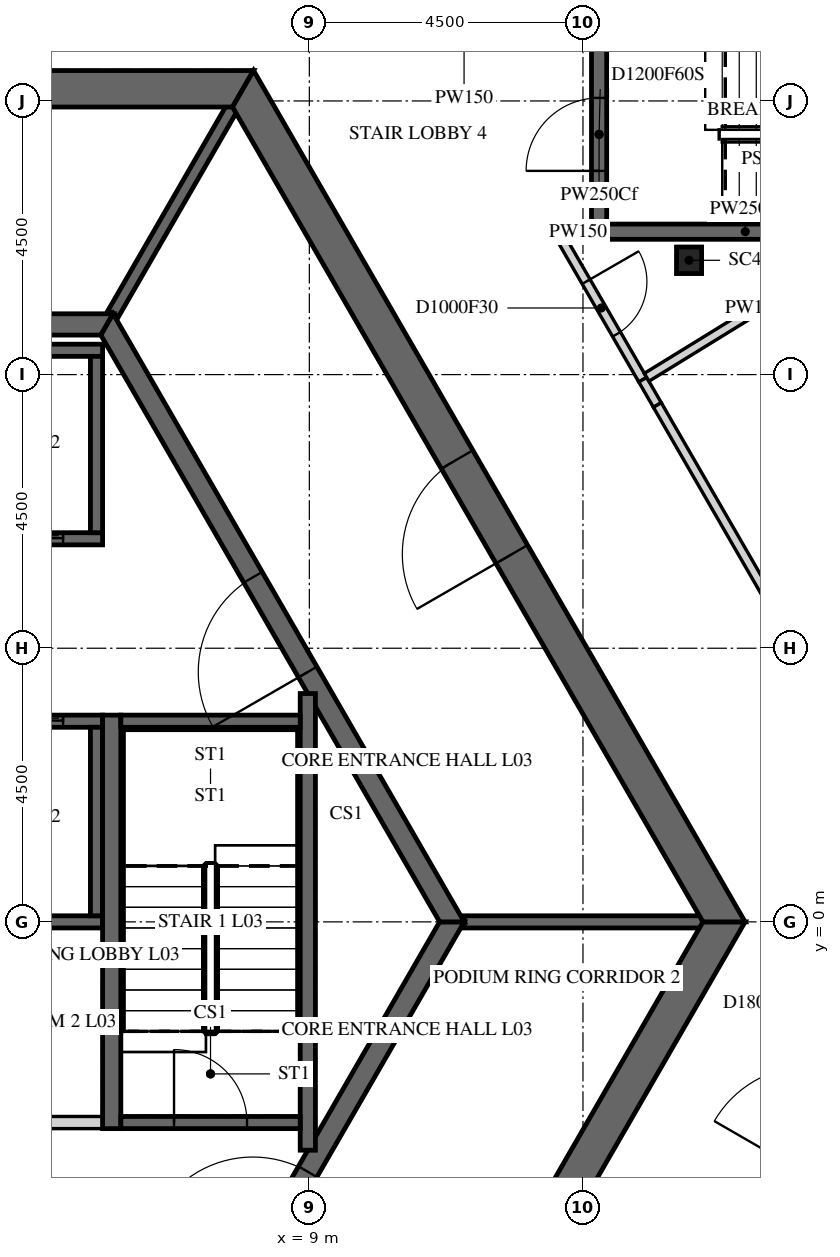
"""IFC4 building model, lengths in metres.
Left out: names, types, materials, properties, quantities, classifications, styles, units other than length and angle.
Written with IfcOpenShell. Run it as: python <this file> out.ifc"""

import sys

from ifc_helpers import new_model, si_unit, direction, frame, frame_2d, origin, origin_2d, place, context, subcontext, project, spatial, polyline, rectangle, i_section, outline, extrude, element, fill, save


model = new_model("IFC4")
c1 = context("Model", 3, precision=1e-05, world=origin(), true_north=direction((0.0, 1.0)))
c2 = subcontext(c1, "Body", "Model", "MODEL_VIEW")
j1 = project(units=[si_unit("LENGTHUNIT", "METRE"), si_unit("PLANEANGLEUNIT", "RADIAN")], contexts=[c1])
p1 = place(None, origin())
s1 = spatial("IfcSite", under=j1, at=p1, CompositionType="ELEMENT")
p2 = place(p1, origin())
s2 = spatial("IfcBuilding", under=s1, at=p2, CompositionType="ELEMENT")
p3 = place(p2, frame((0.0, 0.0, 20.5)))
s3 = spatial("IfcBuildingStorey", under=s2, at=p3, CompositionType="ELEMENT", Elevation=20.5)
p4 = place(p3, frame((15.245, 10.88, -0.25), z_axis=(0.0, 0.0, 1.0), x_axis=(1.0, 0.0, 0.0)))
e1 = element("IfcColumn", 1, at=p4, inside=s3, PredefinedType="COLUMN", context=c2, shape_type="SweptSolid", body=[
    extrude(i_section(OverallWidth=0.412, OverallDepth=0.437, WebThickness=0.036, FlangeThickness=0.058, FilletRadius=0.015, at=origin_2d()), origin(), (0.0, 0.0, 1.0), 5.5),
])
p5 = place(p3, frame((7.91, -13.7, -0.25), z_axis=(0.0, 0.0, 1.0), x_axis=(0.499999880136, 0.866025472988, 0.0)))
e2 = element("IfcWall", 2, at=p5, inside=s3, PredefinedType="SHEAR", context=c2, shape_type="SweptSolid", body=[
    extrude(outline(polyline([(-0.173, -0.3), (15.993, -0.3), (15.646, 0.3), (0.173, 0.3), (-0.173, -0.3)])), origin(), (0.0, 0.0, 1.0), 5.5),
])
p6 = place(p5, frame((7.039, 0.0, 0.25)))
e3 = element("IfcOpeningElement", 3, at=p6, cuts=e2, PredefinedType="OPENING", context=c2, shape_type="SweptSolid", body=[
    extrude(rectangle(XDim=1.8, YDim=2.4, at=frame_2d((0.9, 1.2))), frame((0.0, 0.31, 0.0), z_axis=(0.0, -1.0, 0.0), x_axis=(1.0, 0.0, 0.0)), (0.0, 0.0, 1.0), 0.62),
])
p7 = place(p3, frame((15.819, 0.0, -0.25), z_axis=(0.0, 0.0, 1.0), x_axis=(-0.499999880136, 0.866025472988, 0.0)))
e4 = element("IfcWall", 4, at=p7, inside=s3, PredefinedType="SHEAR", context=c2, shape_type="SweptSolid", body=[
    extrude(outline(polyline([(-0.173, -0.3), (15.993, -0.3), (15.646, 0.3), (0.173, 0.3), (-0.173, -0.3)])), origin(), (0.0, 0.0, 1.0), 5.5),
])
p8 = place(p7, frame((6.981, 0.0, 0.25)))
e5 = element("IfcOpeningElement", 5, at=p8, cuts=e4, PredefinedType="OPENING", context=c2, shape_type="SweptSolid", body=[
    extrude(rectangle(XDim=1.8, YDim=2.4, at=frame_2d((0.9, 1.2))), frame((0.0, 0.31, 0.0), z_axis=(0.0, -1.0, 0.0), x_axis=(1.0, 0.0, 0.0)), (0.0, 0.0, 1.0), 0.62),
])
p9 = place(p3, frame((7.91, 13.7, -0.25), z_axis=(0.0, 0.0, 1.0), x_axis=(-1.0, 0.0, 0.0)))
e6 = element("IfcWall", 6, at=p9, inside=s3, PredefinedType="SHEAR", context=c2, shape_type="SweptSolid", body=[
    extrude(outline(polyline([(-0.173, -0.3), (15.993, -0.3), (15.646, 0.3), (0.173, 0.3), (-0.173, -0.3)])), origin(), (0.0, 0.0, 1.0), 5.5),
])
p10 = place(p9, frame((7.31, 0.0, 0.25)))
e7 = element("IfcOpeningElement", 7, at=p10, cuts=e6, PredefinedType="OPENING", context=c2, shape_type="SweptSolid", body=[
    extrude(rectangle(XDim=1.2, YDim=2.4, at=frame_2d((0.6, 1.2))), frame((0.0, 0.31, 0.0), z_axis=(0.0, -1.0, 0.0), x_axis=(1.0, 0.0, 0.0)), (0.0, 0.0, 1.0), 0.62),
])
p11 = place(p3, frame((5.673, -9.825, -0.25), z_axis=(0.0, 0.0, 1.0), x_axis=(0.499995046907, 0.866028263435, 0.0)))
e8 = element("IfcWall", 8, at=p11, inside=s3, PredefinedType="SHEAR", context=c2, shape_type="SweptSolid", body=[
    extrude(outline(polyline([(-0.101, -0.175), (11.446, -0.175), (11.244, 0.175), (0.101, 0.175), (-0.101, -0.175)])), origin(), (0.0, 0.0, 1.0), 5.5),
])
p12 = place(p11, frame((4.801, 0.0, 0.25)))
e9 = element("IfcOpeningElement", 9, at=p12, cuts=e8, PredefinedType="OPENING", context=c2, shape_type="SweptSolid", body=[
    extrude(rectangle(XDim=1.8, YDim=2.4, at=frame_2d((0.9, 1.2))), frame((0.0, 0.185, 0.0), z_axis=(0.0, -1.0, 0.0), x_axis=(1.0, 0.0, 0.0)), (0.0, 0.0, 1.0), 0.37),
])
p13 = place(p3, frame((11.345, 0.0, -0.25), z_axis=(0.0, 0.0, 1.0), x_axis=(-0.499995046907, 0.866028263435, 0.0)))
e10 = element("IfcWall", 10, at=p13, inside=s3, PredefinedType="SHEAR", context=c2, shape_type="SweptSolid", body=[
    extrude(outline(polyline([(-0.101, -0.175), (11.446, -0.175), (11.244, 0.175), (0.101, 0.175), (-0.101, -0.175)])), origin(), (0.0, 0.0, 1.0), 5.5),
])
p14 = place(p13, frame((4.744, 0.0, 0.25)))
e11 = element("IfcOpeningElement", 11, at=p14, cuts=e10, PredefinedType="OPENING", context=c2, shape_type="SweptSolid", body=[
    extrude(rectangle(XDim=1.8, YDim=2.4, at=frame_2d((0.9, 1.2))), frame((0.0, 0.185, 0.0), z_axis=(0.0, -1.0, 0.0), x_axis=(1.0, 0.0, 0.0)), (0.0, 0.0, 1.0), 0.37),
])
p15 = place(p3, frame((5.673, 9.825, -0.25), z_axis=(0.0, 0.0, 1.0), x_axis=(-1.0, 0.0, 0.0)))
e12 = element("IfcWall", 12, at=p15, inside=s3, PredefinedType="SHEAR", context=c2, shape_type="SweptSolid", body=[
    extrude(outline(polyline([(-0.101, -0.175), (11.446, -0.175), (11.244, 0.175), (0.101, 0.175), (-0.101, -0.175)])), origin(), (0.0, 0.0, 1.0), 5.5),
])
p16 = place(p3, frame((-5.6, 6.3, -0.25), z_axis=(0.0, 0.0, 1.0), x_axis=(1.0, 0.0, 0.0)))
e13 = element("IfcWall", 13, at=p16, inside=s3, PredefinedType="SHEAR", context=c2, shape_type="SweptSolid", body=[
    extrude(rectangle(XDim=11.2, YDim=0.2, at=frame_2d((5.6, 0.0))), origin(), (0.0, 0.0, 1.0), 5.5),
])
p17 = place(p16, frame((0.65, 0.0, 0.25)))
e14 = element("IfcOpeningElement", 14, at=p17, cuts=e13, PredefinedType="OPENING", context=c2, shape_type="SweptSolid", body=[
    extrude(rectangle(XDim=1.1, YDim=2.1, at=frame_2d((0.55, 1.05))), frame((0.0, 0.11, 0.0), z_axis=(0.0, -1.0, 0.0), x_axis=(1.0, 0.0, 0.0)), (0.0, 0.0, 1.0), 0.22),
])
p18 = place(p16, frame((2.85, 0.0, 0.25)))
e15 = element("IfcOpeningElement", 15, at=p18, cuts=e13, PredefinedType="OPENING", context=c2, shape_type="SweptSolid", body=[
    extrude(rectangle(XDim=1.1, YDim=2.1, at=frame_2d((0.55, 1.05))), frame((0.0, 0.11, 0.0), z_axis=(0.0, -1.0, 0.0), x_axis=(1.0, 0.0, 0.0)), (0.0, 0.0, 1.0), 0.22),
])
p19 = place(p16, frame((5.05, 0.0, 0.25)))
e16 = element("IfcOpeningElement", 16, at=p19, cuts=e13, PredefinedType="OPENING", context=c2, shape_type="SweptSolid", body=[
    extrude(rectangle(XDim=1.1, YDim=2.1, at=frame_2d((0.55, 1.05))), frame((0.0, 0.11, 0.0), z_axis=(0.0, -1.0, 0.0), x_axis=(1.0, 0.0, 0.0)), (0.0, 0.0, 1.0), 0.22),
])
p20 = place(p16, frame((7.25, 0.0, 0.25)))
e17 = element("IfcOpeningElement", 17, at=p20, cuts=e13, PredefinedType="OPENING", context=c2, shape_type="SweptSolid", body=[
    extrude(rectangle(XDim=1.1, YDim=2.1, at=frame_2d((0.55, 1.05))), frame((0.0, 0.11, 0.0), z_axis=(0.0, -1.0, 0.0), x_axis=(1.0, 0.0, 0.0)), (0.0, 0.0, 1.0), 0.22),
])
p21 = place(p16, frame((9.45, 0.0, 0.25)))
e18 = element("IfcOpeningElement", 18, at=p21, cuts=e13, PredefinedType="OPENING", context=c2, shape_type="SweptSolid", body=[
    extrude(rectangle(XDim=1.1, YDim=2.1, at=frame_2d((0.55, 1.05))), frame((0.0, 0.11, 0.0), z_axis=(0.0, -1.0, 0.0), x_axis=(1.0, 0.0, 0.0)), (0.0, 0.0, 1.0), 0.22),
])
p22 = place(p3, frame((-5.6, 9.4, -0.25), z_axis=(0.0, 0.0, 1.0), x_axis=(1.0, 0.0, 0.0)))
e19 = element("IfcWall", 19, at=p22, inside=s3, PredefinedType="SHEAR", context=c2, shape_type="SweptSolid", body=[
    extrude(rectangle(XDim=11.2, YDim=0.2, at=frame_2d((5.6, 0.0))), origin(), (0.0, 0.0, 1.0), 5.5),
])
p23 = place(p3, frame((5.5, 6.4, -0.25), z_axis=(0.0, 0.0, 1.0), x_axis=(0.0, 1.0, 0.0)))
e20 = element("IfcWall", 20, at=p23, inside=s3, PredefinedType="SHEAR", context=c2, shape_type="SweptSolid", body=[
    extrude(rectangle(XDim=2.9, YDim=0.2, at=frame_2d((1.45, 0.0))), origin(), (0.0, 0.0, 1.0), 5.5),
])
p24 = place(p3, frame((-5.6, 3.3, -0.25), z_axis=(0.0, 0.0, 1.0), x_axis=(1.0, 0.0, 0.0)))
e21 = element("IfcWall", 21, at=p24, inside=s3, PredefinedType="SHEAR", context=c2, shape_type="SweptSolid", body=[
    extrude(rectangle(XDim=11.2, YDim=0.2, at=frame_2d((5.6, 0.0))), origin(), (0.0, 0.0, 1.0), 5.5),
])
p25 = place(p24, frame((0.65, 0.0, 0.25)))
e22 = element("IfcOpeningElement", 22, at=p25, cuts=e21, PredefinedType="OPENING", context=c2, shape_type="SweptSolid", body=[
    extrude(rectangle(XDim=1.1, YDim=2.1, at=frame_2d((0.55, 1.05))), frame((0.0, 0.11, 0.0), z_axis=(0.0, -1.0, 0.0), x_axis=(1.0, 0.0, 0.0)), (0.0, 0.0, 1.0), 0.22),
])
p26 = place(p24, frame((2.85, 0.0, 0.25)))
e23 = element("IfcOpeningElement", 23, at=p26, cuts=e21, PredefinedType="OPENING", context=c2, shape_type="SweptSolid", body=[
    extrude(rectangle(XDim=1.1, YDim=2.1, at=frame_2d((0.55, 1.05))), frame((0.0, 0.11, 0.0), z_axis=(0.0, -1.0, 0.0), x_axis=(1.0, 0.0, 0.0)), (0.0, 0.0, 1.0), 0.22),
])
p27 = place(p24, frame((5.05, 0.0, 0.25)))
e24 = element("IfcOpeningElement", 24, at=p27, cuts=e21, PredefinedType="OPENING", context=c2, shape_type="SweptSolid", body=[
    extrude(rectangle(XDim=1.1, YDim=2.1, at=frame_2d((0.55, 1.05))), frame((0.0, 0.11, 0.0), z_axis=(0.0, -1.0, 0.0), x_axis=(1.0, 0.0, 0.0)), (0.0, 0.0, 1.0), 0.22),
])
p28 = place(p24, frame((7.25, 0.0, 0.25)))
e25 = element("IfcOpeningElement", 25, at=p28, cuts=e21, PredefinedType="OPENING", context=c2, shape_type="SweptSolid", body=[
    extrude(rectangle(XDim=1.1, YDim=2.1, at=frame_2d((0.55, 1.05))), frame((0.0, 0.11, 0.0), z_axis=(0.0, -1.0, 0.0), x_axis=(1.0, 0.0, 0.0)), (0.0, 0.0, 1.0), 0.22),
])
p29 = place(p24, frame((9.45, 0.0, 0.25)))
e26 = element("IfcOpeningElement", 26, at=p29, cuts=e21, PredefinedType="OPENING", context=c2, shape_type="SweptSolid", body=[
    extrude(rectangle(XDim=1.1, YDim=2.1, at=frame_2d((0.55, 1.05))), frame((0.0, 0.11, 0.0), z_axis=(0.0, -1.0, 0.0), x_axis=(1.0, 0.0, 0.0)), (0.0, 0.0, 1.0), 0.22),
])
p30 = place(p3, frame((-5.6, 0.0, -0.25), z_axis=(0.0, 0.0, 1.0), x_axis=(1.0, 0.0, 0.0)))
e27 = element("IfcWall", 27, at=p30, inside=s3, PredefinedType="SHEAR", context=c2, shape_type="SweptSolid", body=[
    extrude(rectangle(XDim=11.2, YDim=0.2, at=frame_2d((5.6, 0.0))), origin(), (0.0, 0.0, 1.0), 5.5),
])
p31 = place(p3, frame((5.5, 0.1, -0.25), z_axis=(0.0, 0.0, 1.0), x_axis=(0.0, 1.0, 0.0)))
e28 = element("IfcWall", 28, at=p31, inside=s3, PredefinedType="SHEAR", context=c2, shape_type="SweptSolid", body=[
    extrude(rectangle(XDim=3.1, YDim=0.2, at=frame_2d((1.55, 0.0))), origin(), (0.0, 0.0, 1.0), 5.5),
])
p32 = place(p3, frame((0.1, -3.3, 0.0), z_axis=(0.0, 0.0, 1.0), x_axis=(1.0, 0.0, 0.0)))
e29 = element("IfcWall", 29, at=p32, inside=s3, PredefinedType="PARTITIONING", context=c2, shape_type="SweptSolid", body=[
    extrude(rectangle(XDim=5.5, YDim=0.2, at=frame_2d((2.75, 0.0))), origin(), (0.0, 0.0, 1.0), 5.25),
])
p33 = place(p32, frame((2.3, 0.0, 0.0)))
e30 = element("IfcOpeningElement", 30, at=p33, cuts=e29, PredefinedType="OPENING", context=c2, shape_type="SweptSolid", body=[
    extrude(rectangle(XDim=0.9, YDim=2.1, at=frame_2d((0.45, 1.05))), frame((0.0, 0.11, 0.0), z_axis=(0.0, -1.0, 0.0), x_axis=(1.0, 0.0, 0.0)), (0.0, 0.0, 1.0), 0.22),
])
p34 = place(p3, frame((11.547, 0.0, -0.25), z_axis=(0.0, 0.0, 1.0), x_axis=(1.0, 0.0, 0.0)))
e31 = element("IfcWall", 31, at=p34, inside=s3, PredefinedType="SHEAR", context=c2, shape_type="SweptSolid", body=[
    extrude(rectangle(XDim=3.926, YDim=0.2, at=frame_2d((1.963, 0.0))), origin(), (0.0, 0.0, 1.0), 5.5),
])
p35 = place(p3, frame((5.773, 10.0, -0.25), z_axis=(0.0, 0.0, 1.0), x_axis=(0.500038251005, 0.86600331843, 0.0)))
e32 = element("IfcWall", 32, at=p35, inside=s3, PredefinedType="SHEAR", context=c2, shape_type="SweptSolid", body=[
    extrude(rectangle(XDim=3.926, YDim=0.2, at=frame_2d((1.963, 0.0))), origin(), (0.0, 0.0, 1.0), 5.5),
])
p36 = place(p3, frame((5.75, -3.4, -0.25), z_axis=(0.0, 0.0, 1.0), x_axis=(0.0, 1.0, 0.0)))
e33 = element("IfcWall", 33, at=p36, inside=s3, PredefinedType="SHEAR", context=c2, shape_type="SweptSolid", body=[
    extrude(rectangle(XDim=6.8, YDim=0.3, at=frame_2d((3.4, 0.0))), origin(), (0.0, 0.0, 1.0), 5.5),
])
p37 = place(p3, frame((8.975, -3.755, -0.25), z_axis=(0.0, 0.0, 1.0), x_axis=(0.0, 1.0, 0.0)))
e34 = element("IfcWall", 34, at=p37, inside=s3, PredefinedType="SHEAR", context=c2, shape_type="SweptSolid", body=[
    extrude(rectangle(XDim=7.51, YDim=0.25, at=frame_2d((3.755, 0.0))), origin(), (0.0, 0.0, 1.0), 5.5),
])
p38 = place(p3, frame((5.9, 3.3, -0.25), z_axis=(0.0, 0.0, 1.0), x_axis=(1.0, 0.0, 0.0)))
e35 = element("IfcWall", 35, at=p38, inside=s3, PredefinedType="SHEAR", context=c2, shape_type="SweptSolid", body=[
    extrude(rectangle(XDim=2.95, YDim=0.2, at=frame_2d((1.475, 0.0))), origin(), (0.0, 0.0, 1.0), 5.5),
])
p39 = place(p3, frame((5.9, -3.3, -0.25), z_axis=(0.0, 0.0, 1.0), x_axis=(1.0, 0.0, 0.0)))
e36 = element("IfcWall", 36, at=p39, inside=s3, PredefinedType="SHEAR", context=c2, shape_type="SweptSolid", body=[
    extrude(rectangle(XDim=2.95, YDim=0.2, at=frame_2d((1.475, 0.0))), origin(), (0.0, 0.0, 1.0), 5.5),
])
p40 = place(p39, frame((0.875, 0.0, 0.25)))
e37 = element("IfcOpeningElement", 37, at=p40, cuts=e36, PredefinedType="OPENING", context=c2, shape_type="SweptSolid", body=[
    extrude(rectangle(XDim=1.2, YDim=2.4, at=frame_2d((0.6, 1.2))), frame((0.0, 0.11, 0.0), z_axis=(0.0, -1.0, 0.0), x_axis=(1.0, 0.0, 0.0)), (0.0, 0.0, 1.0), 0.22),
])
p41 = place(p3, frame((13.765, 11.35, 0.0), z_axis=(0.0, 0.0, 1.0), x_axis=(-1.0, 0.0, 0.0)))
e38 = element("IfcWall", 38, at=p41, inside=s3, PredefinedType="PARTITIONING", context=c2, shape_type="SweptSolid", body=[
    extrude(rectangle(XDim=0.688, YDim=0.15, at=frame_2d((0.344, 0.0))), origin(), (0.0, 0.0, 1.0), 5.25),
])
p42 = place(p3, frame((13.765, 11.425, 0.0), z_axis=(0.0, 0.0, 1.0), x_axis=(0.0, 1.0, 0.0)))
e39 = element("IfcWall", 39, at=p42, inside=s3, PredefinedType="PARTITIONING", context=c2, shape_type="SweptSolid", body=[
    extrude(rectangle(XDim=3.05, YDim=0.25, at=frame_2d((1.525, 0.0))), origin(), (0.0, 0.0, 1.0), 4.496),
])
p43 = place(p42, frame((0.925, 0.0, 0.0)))
e40 = element("IfcOpeningElement", 40, at=p43, cuts=e39, PredefinedType="OPENING", context=c2, shape_type="SweptSolid", body=[
    extrude(rectangle(XDim=1.2, YDim=2.1, at=frame_2d((0.6, 1.05))), frame((0.0, 0.135, 0.0), z_axis=(0.0, -1.0, 0.0), x_axis=(1.0, 0.0, 0.0)), (0.0, 0.0, 1.0), 0.27),
])
p44 = place(p3, frame((13.12, 11.275, 0.0), z_axis=(0.0, 0.0, 1.0), x_axis=(0.500177554253, -0.865922868517, 0.0)))
e41 = element("IfcWall", 41, at=p44, inside=s3, PredefinedType="PARTITIONING", context=c2, shape_type="SweptSolid", body=[
    extrude(rectangle(XDim=2.724, YDim=0.15, at=frame_2d((1.362, 0.0))), origin(), (0.0, 0.0, 1.0), 5.25),
])
p45 = place(p44, frame((0.862, 0.0, 0.0)))
e42 = element("IfcOpeningElement", 42, at=p45, cuts=e41, PredefinedType="OPENING", context=c2, shape_type="SweptSolid", body=[
    extrude(rectangle(XDim=1.0, YDim=2.1, at=frame_2d((0.5, 1.05))), frame((0.0, 0.085, 0.0), z_axis=(0.0, -1.0, 0.0), x_axis=(1.0, 0.0, 0.0)), (0.0, 0.0, 1.0), 0.17),
])
p46 = place(p3, frame((14.723, 8.5, 0.0), z_axis=(0.0, 0.0, 1.0), x_axis=(-0.499693115345, 0.866202511239, 0.0)))
e43 = element("IfcWall", 43, at=p46, inside=s3, PredefinedType="PARTITIONING", context=c2, shape_type="SweptSolid", body=[
    extrude(rectangle(XDim=0.48, YDim=0.15, at=frame_2d((0.24, 0.0))), origin(), (0.0, 0.0, 1.0), 5.25),
])
p47 = place(p3, frame((15.227, -7.625, 0.0), z_axis=(0.0, 0.0, 1.0), x_axis=(0.500053906551, 0.865994278585, 0.0)))
e44 = element("IfcWall", 44, at=p47, inside=s3, PredefinedType="PARTITIONING", context=c2, shape_type="SweptSolid", body=[
    extrude(rectangle(XDim=6.928, YDim=0.15, at=frame_2d((3.464, 0.0))), origin(), (0.0, 0.0, 1.0), 5.25),
])
p48 = place(p47, frame((1.146, 0.0, 0.0)))
e45 = element("IfcOpeningElement", 45, at=p48, cuts=e44, PredefinedType="OPENING", context=c2, shape_type="SweptSolid", body=[
    extrude(rectangle(XDim=1.8, YDim=2.1, at=frame_2d((0.9, 1.05))), frame((0.0, 0.085, 0.0), z_axis=(0.0, -1.0, 0.0), x_axis=(1.0, 0.0, 0.0)), (0.0, 0.0, 1.0), 0.17),
])
p49 = place(p47, frame((3.983, 0.0, 0.0)))
e46 = element("IfcOpeningElement", 46, at=p49, cuts=e44, PredefinedType="OPENING", context=c2, shape_type="SweptSolid", body=[
    extrude(rectangle(XDim=1.8, YDim=2.1, at=frame_2d((0.9, 1.05))), frame((0.0, 0.085, 0.0), z_axis=(0.0, -1.0, 0.0), x_axis=(1.0, 0.0, 0.0)), (0.0, 0.0, 1.0), 0.17),
])
p50 = place(p3, frame((17.339, 3.968, 0.0), z_axis=(0.0, 0.0, 1.0), x_axis=(-0.499952654668, 0.866052736899, 0.0)))
e47 = element("IfcWall", 47, at=p50, inside=s3, PredefinedType="PARTITIONING", context=c2, shape_type="SweptSolid", body=[
    extrude(rectangle(XDim=5.233, YDim=0.15, at=frame_2d((2.616, 0.0))), origin(), (0.0, 0.0, 1.0), 5.25),
])
p51 = place(p3, frame((18.234, 11.225, 0.0), z_axis=(0.0, 0.0, 1.0), x_axis=(-0.851571181887, -0.524238993379, 0.0)))
e48 = element("IfcWall", 48, at=p51, inside=s3, PredefinedType="PARTITIONING", context=c2, shape_type="SweptSolid", body=[
    extrude(rectangle(XDim=4.33, YDim=0.15, at=frame_2d((2.165, 0.0))), origin(), (0.0, 0.0, 1.0), 4.323),
])
p52 = place(p3, frame((18.447, 11.35, 0.0), z_axis=(0.0, 0.0, 1.0), x_axis=(-1.0, 0.0, 0.0)))
e49 = element("IfcWall", 49, at=p52, inside=s3, PredefinedType="PARTITIONING", context=c2, shape_type="SweptSolid", body=[
    extrude(rectangle(XDim=4.557, YDim=0.25, at=frame_2d((2.279, 0.0))), origin(), (0.0, 0.0, 1.0), 5.25),
])
p53 = place(p8, origin())
e50 = element("IfcDoor", 50, at=p53, inside=s3, OperationType="DOUBLE_DOOR_SINGLE_SWING", PredefinedType="DOOR", context=c2, shape_type="SweptSolid", body=[
    extrude(rectangle(XDim=1.8, YDim=2.4, at=frame_2d((0.9, 1.2))), frame((0.0, 0.025, 0.0), z_axis=(0.0, -1.0, 0.0), x_axis=(1.0, 0.0, 0.0)), (0.0, 0.0, 1.0), 0.05),
])
fill(e5, e50)
p54 = place(p14, origin())
e51 = element("IfcDoor", 51, at=p54, inside=s3, OperationType="DOUBLE_DOOR_SINGLE_SWING", PredefinedType="DOOR", context=c2, shape_type="SweptSolid", body=[
    extrude(rectangle(XDim=1.8, YDim=2.4, at=frame_2d((0.9, 1.2))), frame((0.0, 0.025, 0.0), z_axis=(0.0, -1.0, 0.0), x_axis=(1.0, 0.0, 0.0)), (0.0, 0.0, 1.0), 0.05),
])
fill(e11, e51)
p55 = place(p12, origin())
e52 = element("IfcDoor", 52, at=p55, inside=s3, OperationType="DOUBLE_DOOR_SINGLE_SWING", PredefinedType="DOOR", context=c2, shape_type="SweptSolid", body=[
    extrude(rectangle(XDim=1.8, YDim=2.4, at=frame_2d((0.9, 1.2))), frame((0.0, 0.025, 0.0), z_axis=(0.0, -1.0, 0.0), x_axis=(1.0, 0.0, 0.0)), (0.0, 0.0, 1.0), 0.05),
])
fill(e9, e52)
p56 = place(p40, origin())
e53 = element("IfcDoor", 53, at=p56, inside=s3, OperationType="SINGLE_SWING_LEFT", PredefinedType="DOOR", context=c2, shape_type="SweptSolid", body=[
    extrude(rectangle(XDim=1.2, YDim=2.4, at=frame_2d((0.6, 1.2))), frame((0.0, 0.025, 0.0), z_axis=(0.0, -1.0, 0.0), x_axis=(1.0, 0.0, 0.0)), (0.0, 0.0, 1.0), 0.05),
])
fill(e37, e53)
p57 = place(p21, origin())
e54 = element("IfcDoor", 54, at=p57, inside=s3, OperationType="SLIDING_TO_LEFT", PredefinedType="DOOR", context=c2, shape_type="SweptSolid", body=[
    extrude(rectangle(XDim=1.1, YDim=2.1, at=frame_2d((0.55, 1.05))), frame((0.0, 0.025, 0.0), z_axis=(0.0, -1.0, 0.0), x_axis=(1.0, 0.0, 0.0)), (0.0, 0.0, 1.0), 0.05),
])
fill(e18, e54)
p58 = place(p29, origin())
e55 = element("IfcDoor", 55, at=p58, inside=s3, OperationType="SLIDING_TO_LEFT", PredefinedType="DOOR", context=c2, shape_type="SweptSolid", body=[
    extrude(rectangle(XDim=1.1, YDim=2.1, at=frame_2d((0.55, 1.05))), frame((0.0, 0.025, 0.0), z_axis=(0.0, -1.0, 0.0), x_axis=(1.0, 0.0, 0.0)), (0.0, 0.0, 1.0), 0.05),
])
fill(e26, e55)
p59 = place(p43, origin())
e56 = element("IfcDoor", 56, at=p59, inside=s3, OperationType="SINGLE_SWING_LEFT", PredefinedType="DOOR", context=c2, shape_type="SweptSolid", body=[
    extrude(rectangle(XDim=1.2, YDim=2.1, at=frame_2d((0.6, 1.05))), frame((0.0, 0.025, 0.0), z_axis=(0.0, -1.0, 0.0), x_axis=(1.0, 0.0, 0.0)), (0.0, 0.0, 1.0), 0.05),
])
fill(e40, e56)
p60 = place(p45, origin())
e57 = element("IfcDoor", 57, at=p60, inside=s3, OperationType="SINGLE_SWING_RIGHT", PredefinedType="DOOR", context=c2, shape_type="SweptSolid", body=[
    extrude(rectangle(XDim=1.0, YDim=2.1, at=frame_2d((0.5, 1.05))), frame((0.0, 0.025, 0.0), z_axis=(0.0, -1.0, 0.0), x_axis=(1.0, 0.0, 0.0)), (0.0, 0.0, 1.0), 0.05),
])
fill(e42, e57)
save(model, sys.argv[1])
